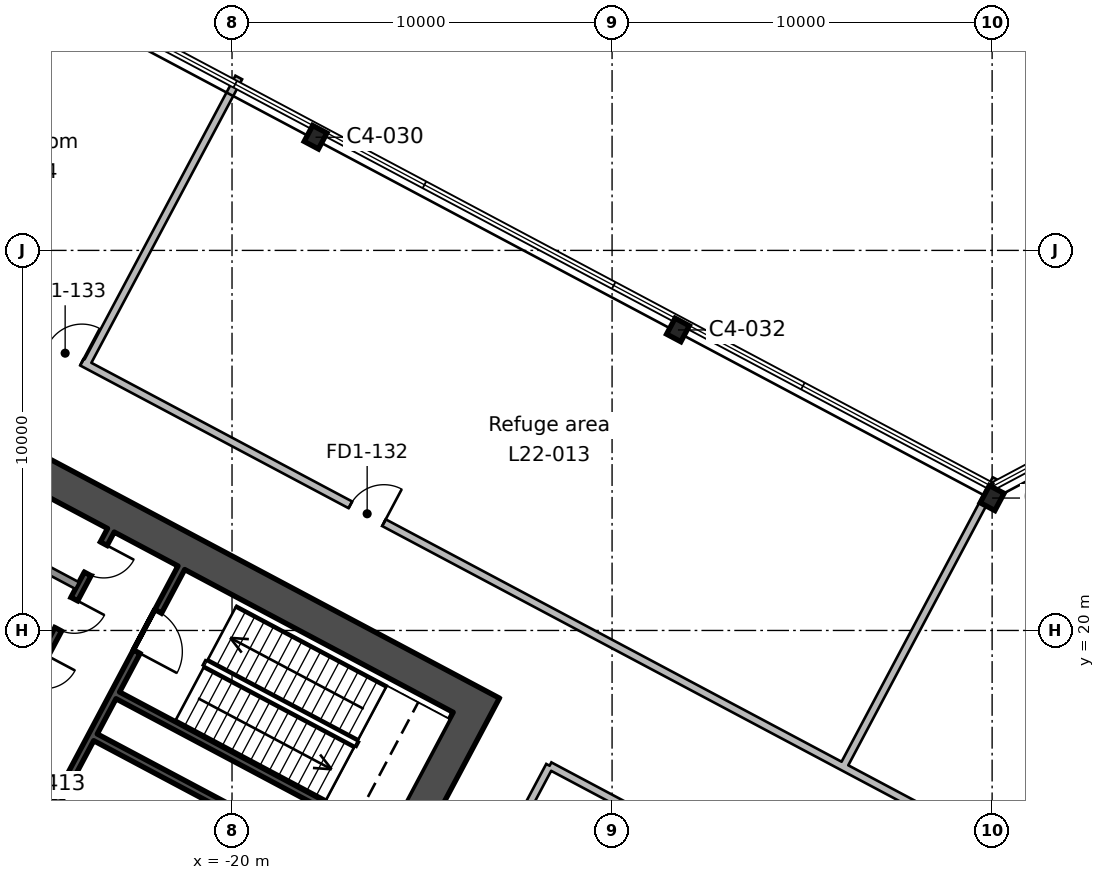
"""IFC4 building model, lengths in metres.
Left out: names, types, materials, properties, quantities, classifications, styles, units other than length and angle.
Written with IfcOpenShell. Run it as: python <this file> out.ifc"""

import sys

from ifc_helpers import new_model, si_unit, direction, frame, frame_2d, origin, origin_2d, place, context, subcontext, project, spatial, rectangle, i_section, extrude, element, fill, save


model = new_model("IFC4")
c1 = context("Model", 3, precision=1e-05, world=origin(), true_north=direction((0.0, 1.0)))
c2 = subcontext(c1, "Body", "Model", "MODEL_VIEW")
j1 = project(units=[si_unit("LENGTHUNIT", "METRE"), si_unit("PLANEANGLEUNIT", "RADIAN")], contexts=[c1])
p1 = place(None, origin())
s1 = spatial("IfcSite", under=j1, at=p1, CompositionType="ELEMENT")
p2 = place(p1, origin())
s2 = spatial("IfcBuilding", under=s1, at=p2, CompositionType="ELEMENT")
p3 = place(p2, frame((0.0, 0.0, 112.2)))
s3 = spatial("IfcBuildingStorey", under=s2, at=p3, CompositionType="ELEMENT", Elevation=112.2)
p4 = place(p3, frame((0.0, 23.484, 0.0), z_axis=(0.0, 0.0, 1.0), x_axis=(-0.882947592859, 0.469471562786, 0.0)))
e1 = element("IfcColumn", 1, at=p4, inside=s3, PredefinedType="COLUMN", context=c2, shape_type="SweptSolid", body=[
    extrude(i_section(OverallWidth=0.437, OverallDepth=0.513, WebThickness=0.061, FlangeThickness=0.097, FilletRadius=0.015, at=origin_2d()), origin(), (0.0, 0.0, 1.0), 6.0),
])
for number, where, z_axis, x_axis in (
    (2, (-8.266, 27.907, 0.0), (0.0, 0.0, 1.0), (-0.883, 0.469, 0.0)),
    (3, (-17.802, 32.978, 0.0), (0.0, 0.0, 1.0), (-0.883, 0.469, 0.0)),
):
    element("IfcColumn", number, at=place(p3, frame(where, z_axis=z_axis, x_axis=x_axis)), inside=s3, PredefinedType="COLUMN", context=c2, shape_type="SweptSolid", body=[
        extrude(i_section(OverallWidth=0.424, OverallDepth=0.475, WebThickness=0.048, FlangeThickness=0.077, FilletRadius=0.015, at=origin_2d()), origin(), (0.0, 0.0, 1.0), 6.0),
    ])
p5 = place(p3, frame((-13.362, 18.43, 0.0), z_axis=(0.0, 0.0, 1.0), x_axis=(-0.46947084998, -0.882947971864, 0.0)))
e4 = element("IfcWall", 4, at=p5, inside=s3, PredefinedType="SHEAR", context=c2, shape_type="SweptSolid", body=[
    extrude(rectangle(XDim=20.0, YDim=0.9, at=frame_2d((10.0, 0.0))), origin(), (0.0, 0.0, 1.0), 6.0),
])
p6 = place(p5, frame((7.0, 0.0, 0.0)))
e5 = element("IfcOpeningElement", 5, at=p6, cuts=e4, PredefinedType="OPENING", context=c2, shape_type="SweptSolid", body=[
    extrude(rectangle(XDim=2.4, YDim=2.4, at=frame_2d((1.2, 1.2))), frame((0.0, 0.46, 0.0), z_axis=(0.0, -1.0, 0.0), x_axis=(1.0, 0.0, 0.0)), (0.0, 0.0, 1.0), 0.92),
])
p7 = place(p3, frame((-13.97, 18.244, 0.0), z_axis=(0.0, 0.0, 1.0), x_axis=(-0.88294509198, 0.469476266226, 0.0)))
e6 = element("IfcWall", 6, at=p7, inside=s3, PredefinedType="SHEAR", context=c2, shape_type="SweptSolid", body=[
    extrude(rectangle(XDim=20.2, YDim=0.9, at=frame_2d((10.1, 0.0))), origin(), (0.0, 0.0, 1.0), 6.0),
])
p8 = place(p3, frame((-21.333, 21.649, 0.0), z_axis=(0.0, 0.0, 1.0), x_axis=(-0.469494272526, -0.882935517501, 0.0)))
e7 = element("IfcWall", 7, at=p8, inside=s3, PredefinedType="SHEAR", context=c2, shape_type="SweptSolid", body=[
    extrude(rectangle(XDim=7.3, YDim=0.2, at=frame_2d((3.65, 0.0))), origin(), (0.0, 0.0, 1.0), 6.0),
])
p9 = place(p8, frame((1.3, 0.0, 0.0)))
e8 = element("IfcOpeningElement", 8, at=p9, cuts=e7, PredefinedType="OPENING", context=c2, shape_type="SweptSolid", body=[
    extrude(rectangle(XDim=1.2, YDim=2.1, at=frame_2d((0.6, 1.05))), frame((0.0, 0.11, 0.0), z_axis=(0.0, -1.0, 0.0), x_axis=(1.0, 0.0, 0.0)), (0.0, 0.0, 1.0), 0.22),
])
p10 = place(p3, frame((-23.188, 22.635, 0.0), z_axis=(0.0, 0.0, 1.0), x_axis=(-0.469454336211, -0.882956752176, 0.0)))
e9 = element("IfcWall", 9, at=p10, inside=s3, PredefinedType="SHEAR", context=c2, shape_type="SweptSolid", body=[
    extrude(rectangle(XDim=7.3, YDim=0.2, at=frame_2d((3.65, 0.0))), origin(), (0.0, 0.0, 1.0), 6.0),
])
p11 = place(p10, frame((0.4, 0.0, 0.0)))
e10 = element("IfcOpeningElement", 10, at=p11, cuts=e9, PredefinedType="OPENING", context=c2, shape_type="SweptSolid", body=[
    extrude(rectangle(XDim=0.9, YDim=2.1, at=frame_2d((0.45, 1.05))), frame((0.0, 0.11, 0.0), z_axis=(0.0, -1.0, 0.0), x_axis=(1.0, 0.0, 0.0)), (0.0, 0.0, 1.0), 0.22),
])
p12 = place(p10, frame((2.05, 0.0, 0.0)))
e11 = element("IfcOpeningElement", 11, at=p12, cuts=e9, PredefinedType="OPENING", context=c2, shape_type="SweptSolid", body=[
    extrude(rectangle(XDim=0.9, YDim=2.1, at=frame_2d((0.45, 1.05))), frame((0.0, 0.11, 0.0), z_axis=(0.0, -1.0, 0.0), x_axis=(1.0, 0.0, 0.0)), (0.0, 0.0, 1.0), 0.22),
])
p13 = place(p10, frame((3.7, 0.0, 0.0)))
e12 = element("IfcOpeningElement", 12, at=p13, cuts=e9, PredefinedType="OPENING", context=c2, shape_type="SweptSolid", body=[
    extrude(rectangle(XDim=0.9, YDim=2.1, at=frame_2d((0.45, 1.05))), frame((0.0, 0.11, 0.0), z_axis=(0.0, -1.0, 0.0), x_axis=(1.0, 0.0, 0.0)), (0.0, 0.0, 1.0), 0.22),
])
p14 = place(p3, frame((-24.074, 21.181, 0.0), z_axis=(0.0, 0.0, 1.0), x_axis=(-0.882953967957, 0.469459572775, 0.0)))
e13 = element("IfcWall", 13, at=p14, inside=s3, PredefinedType="SOLIDWALL", context=c2, shape_type="SweptSolid", body=[
    extrude(rectangle(XDim=5.2, YDim=0.2, at=frame_2d((2.6, 0.0))), origin(), (0.0, 0.0, 1.0), 6.0),
])
p15 = place(p3, frame((-15.942, 14.536, 0.0), z_axis=(0.0, 0.0, 1.0), x_axis=(-0.882946947542, 0.469472776449, 0.0)))
e14 = element("IfcWall", 14, at=p15, inside=s3, PredefinedType="SHEAR", context=c2, shape_type="SweptSolid", body=[
    extrude(rectangle(XDim=8.0, YDim=0.2, at=frame_2d((4.0, 0.0))), origin(), (0.0, 0.0, 1.0), 6.0),
])
p16 = place(p3, frame((-16.529, 13.432, 0.0), z_axis=(0.0, 0.0, 1.0), x_axis=(-0.88295287151, 0.469461634952, 0.0)))
e15 = element("IfcWall", 15, at=p16, inside=s3, PredefinedType="SHEAR", context=c2, shape_type="SweptSolid", body=[
    extrude(rectangle(XDim=8.0, YDim=0.2, at=frame_2d((4.0, 0.0))), origin(), (0.0, 0.0, 1.0), 6.0),
])
p17 = place(p3, frame((-32.823, 31.779, 0.0), z_axis=(0.0, 0.0, 1.0), x_axis=(0.88294925653, -0.469468433863, 0.0)))
e16 = element("IfcWall", 16, at=p17, inside=s3, PredefinedType="PARTITIONING", context=c2, shape_type="SweptSolid", body=[
    extrude(rectangle(XDim=37.174, YDim=0.2, at=frame_2d((18.587, 0.0))), origin(), (0.0, 0.0, 1.0), 5.55),
])
p18 = place(p17, frame((18.05, 0.0, 0.0)))
e17 = element("IfcOpeningElement", 17, at=p18, cuts=e16, PredefinedType="OPENING", context=c2, shape_type="SweptSolid", body=[
    extrude(rectangle(XDim=1.0, YDim=2.1, at=frame_2d((0.5, 1.05))), frame((0.0, 0.11, 0.0), z_axis=(0.0, -1.0, 0.0), x_axis=(1.0, 0.0, 0.0)), (0.0, 0.0, 1.0), 0.22),
])
p19 = place(p17, frame((9.05, 0.0, 0.0)))
e18 = element("IfcOpeningElement", 18, at=p19, cuts=e16, PredefinedType="OPENING", context=c2, shape_type="SweptSolid", body=[
    extrude(rectangle(XDim=1.0, YDim=2.1, at=frame_2d((0.5, 1.05))), frame((0.0, 0.11, 0.0), z_axis=(0.0, -1.0, 0.0), x_axis=(1.0, 0.0, 0.0)), (0.0, 0.0, 1.0), 0.22),
])
p20 = place(p3, frame((0.0, 14.327, 0.0), z_axis=(0.0, 0.0, 1.0), x_axis=(0.882944972043, 0.46947649179, 0.0)))
e19 = element("IfcWall", 19, at=p20, inside=s3, PredefinedType="PARTITIONING", context=c2, shape_type="SweptSolid", body=[
    extrude(rectangle(XDim=35.482, YDim=0.2, at=frame_2d((17.741, 0.0))), origin(), (0.0, 0.0, 1.0), 5.55),
])
p21 = place(p20, frame((25.65, 0.0, 0.0)))
e20 = element("IfcOpeningElement", 20, at=p21, cuts=e19, PredefinedType="OPENING", context=c2, shape_type="SweptSolid", body=[
    extrude(rectangle(XDim=1.0, YDim=2.1, at=frame_2d((0.5, 1.05))), frame((0.0, 0.11, 0.0), z_axis=(0.0, -1.0, 0.0), x_axis=(1.0, 0.0, 0.0)), (0.0, 0.0, 1.0), 0.22),
])
p22 = place(p20, frame((17.25, 0.0, 0.0)))
e21 = element("IfcOpeningElement", 21, at=p22, cuts=e19, PredefinedType="OPENING", context=c2, shape_type="SweptSolid", body=[
    extrude(rectangle(XDim=1.0, YDim=2.1, at=frame_2d((0.5, 1.05))), frame((0.0, 0.11, 0.0), z_axis=(0.0, -1.0, 0.0), x_axis=(1.0, 0.0, 0.0)), (0.0, 0.0, 1.0), 0.22),
])
p23 = place(p20, frame((8.55, 0.0, 0.0)))
e22 = element("IfcOpeningElement", 22, at=p23, cuts=e19, PredefinedType="OPENING", context=c2, shape_type="SweptSolid", body=[
    extrude(rectangle(XDim=1.0, YDim=2.1, at=frame_2d((0.5, 1.05))), frame((0.0, 0.11, 0.0), z_axis=(0.0, -1.0, 0.0), x_axis=(1.0, 0.0, 0.0)), (0.0, 0.0, 1.0), 0.22),
])
p24 = place(p3, frame((-19.822, 34.55, 0.0), z_axis=(0.0, 0.0, 1.0), x_axis=(-0.469471844694, -0.882947442965, 0.0)))
e23 = element("IfcWall", 23, at=p24, inside=s3, PredefinedType="PARTITIONING", context=c2, shape_type="SweptSolid", body=[
    extrude(rectangle(XDim=8.55, YDim=0.2, at=frame_2d((4.275, 0.0))), origin(), (0.0, 0.0, 1.0), 5.55),
])
p25 = place(p3, frame((-20.142, 0.46, 0.0), z_axis=(0.0, 0.0, 1.0), x_axis=(0.469506937019, 0.882928783136, 0.0)))
e24 = element("IfcWall", 24, at=p25, inside=s3, PredefinedType="PARTITIONING", context=c2, shape_type="SweptSolid", body=[
    extrude(rectangle(XDim=18.1, YDim=0.2, at=frame_2d((9.05, 0.0))), origin(), (0.0, 0.0, 1.0), 5.55),
])
p26 = place(p25, frame((8.55, 0.0, 0.0)))
e25 = element("IfcOpeningElement", 25, at=p26, cuts=e24, PredefinedType="OPENING", context=c2, shape_type="SweptSolid", body=[
    extrude(rectangle(XDim=1.0, YDim=2.1, at=frame_2d((0.5, 1.05))), frame((0.0, 0.11, 0.0), z_axis=(0.0, -1.0, 0.0), x_axis=(1.0, 0.0, 0.0)), (0.0, 0.0, 1.0), 0.22),
])
p27 = place(p3, frame((-11.644, 16.441, 0.0), z_axis=(0.0, 0.0, 1.0), x_axis=(0.882949196505, -0.469468546753, 0.0)))
e26 = element("IfcWall", 26, at=p27, inside=s3, PredefinedType="PARTITIONING", context=c2, shape_type="SweptSolid", body=[
    extrude(rectangle(XDim=5.355, YDim=0.2, at=frame_2d((2.677, 0.0))), origin(), (0.0, 0.0, 1.0), 5.55),
])
p28 = place(p3, frame((0.105, 23.984, 0.0), z_axis=(0.0, 0.0, 1.0), x_axis=(-0.469314098299, -0.883031300203, 0.0)))
e27 = element("IfcWall", 27, at=p28, inside=s3, PredefinedType="PARTITIONING", context=c2, shape_type="SweptSolid", body=[
    extrude(rectangle(XDim=8.576, YDim=0.2, at=frame_2d((4.288, 0.0))), origin(), (0.0, 0.0, 1.0), 5.55),
])
p29 = place(p9, origin())
e28 = element("IfcDoor", 28, at=p29, inside=s3, OperationType="SINGLE_SWING_RIGHT", PredefinedType="DOOR", context=c2, shape_type="SweptSolid", body=[
    extrude(rectangle(XDim=1.2, YDim=2.1, at=frame_2d((0.6, 1.05))), frame((0.0, 0.025, 0.0), z_axis=(0.0, -1.0, 0.0), x_axis=(1.0, 0.0, 0.0)), (0.0, 0.0, 1.0), 0.05),
])
fill(e8, e28)
p30 = place(p11, origin())
e29 = element("IfcDoor", 29, at=p30, inside=s3, OperationType="SINGLE_SWING_LEFT", PredefinedType="DOOR", context=c2, shape_type="SweptSolid", body=[
    extrude(rectangle(XDim=0.9, YDim=2.1, at=frame_2d((0.45, 1.05))), frame((0.0, 0.025, 0.0), z_axis=(0.0, -1.0, 0.0), x_axis=(1.0, 0.0, 0.0)), (0.0, 0.0, 1.0), 0.05),
])
fill(e10, e29)
p31 = place(p12, origin())
e30 = element("IfcDoor", 30, at=p31, inside=s3, OperationType="SINGLE_SWING_LEFT", PredefinedType="DOOR", context=c2, shape_type="SweptSolid", body=[
    extrude(rectangle(XDim=0.9, YDim=2.1, at=frame_2d((0.45, 1.05))), frame((0.0, 0.025, 0.0), z_axis=(0.0, -1.0, 0.0), x_axis=(1.0, 0.0, 0.0)), (0.0, 0.0, 1.0), 0.05),
])
fill(e11, e30)
p32 = place(p18, origin())
e31 = element("IfcDoor", 31, at=p32, inside=s3, OperationType="SINGLE_SWING_RIGHT", PredefinedType="DOOR", context=c2, shape_type="SweptSolid", body=[
    extrude(rectangle(XDim=1.0, YDim=2.1, at=frame_2d((0.5, 1.05))), frame((0.0, 0.025, 0.0), z_axis=(0.0, -1.0, 0.0), x_axis=(1.0, 0.0, 0.0)), (0.0, 0.0, 1.0), 0.05),
])
fill(e17, e31)
p33 = place(p19, origin())
e32 = element("IfcDoor", 32, at=p33, inside=s3, OperationType="SINGLE_SWING_RIGHT", PredefinedType="DOOR", context=c2, shape_type="SweptSolid", body=[
    extrude(rectangle(XDim=1.0, YDim=2.1, at=frame_2d((0.5, 1.05))), frame((0.0, 0.025, 0.0), z_axis=(0.0, -1.0, 0.0), x_axis=(1.0, 0.0, 0.0)), (0.0, 0.0, 1.0), 0.05),
])
fill(e18, e32)
save(model, sys.argv[1])
